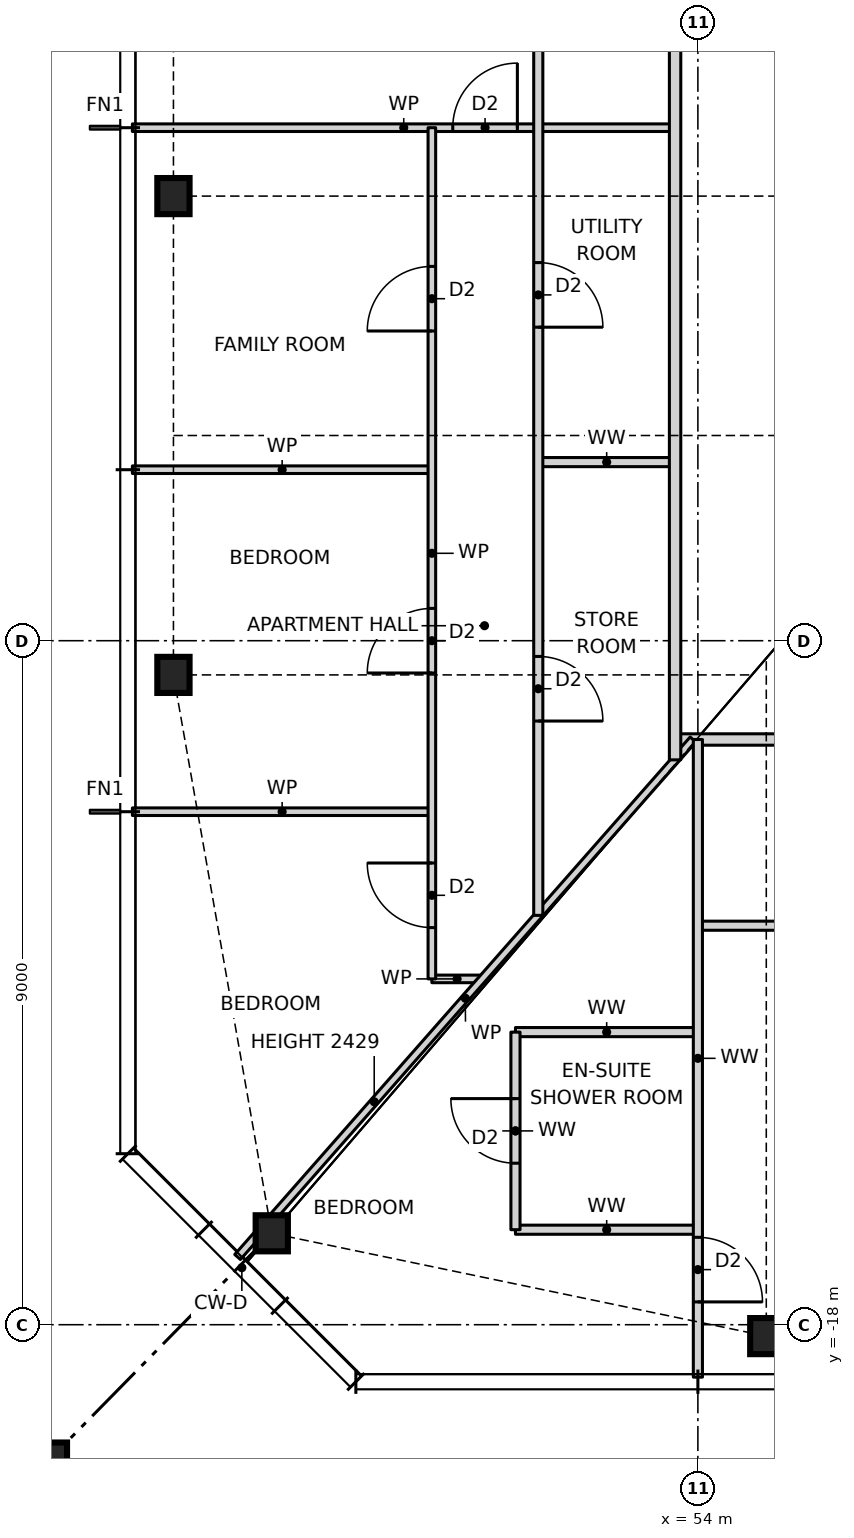
"""IFC4 building model, lengths in metres.
Left out: names, types, materials, properties, quantities, classifications, styles, units other than length and angle.
Written with IfcOpenShell. Run it as: python <this file> out.ifc"""

import sys

from ifc_helpers import new_model, si_unit, direction, frame, frame_2d, origin, origin_2d, place, context, subcontext, project, spatial, rectangle, hollow_rectangle, i_section, extrude, element, fill, save


model = new_model("IFC4")
c1 = context("Model", 3, precision=1e-05, world=origin(), true_north=direction((0.0, 1.0)))
c2 = subcontext(c1, "Body", "Model", "MODEL_VIEW")
j1 = project(units=[si_unit("LENGTHUNIT", "METRE"), si_unit("PLANEANGLEUNIT", "RADIAN")], contexts=[c1])
p1 = place(None, origin())
s1 = spatial("IfcSite", under=j1, at=p1, CompositionType="ELEMENT")
p2 = place(p1, origin())
s2 = spatial("IfcBuilding", under=s1, at=p2, CompositionType="ELEMENT")
p3 = place(p2, frame((0.0, 0.0, 39.5)))
s3 = spatial("IfcBuildingStorey", under=s2, at=p3, CompositionType="ELEMENT", Elevation=39.5)
for number, where, z_axis, x_axis in (
    (1, (48.394, -16.797, 0.0), (0.0, 0.0, 1.0), (1.0, 0.0, 0.0)),
    (2, (54.9, -18.15, 0.0), (0.0, 0.0, 1.0), (1.0, 0.0, 0.0)),
    (3, (47.1, -3.15, 0.0), (0.0, 0.0, 1.0), (1.0, 0.0, 0.0)),
    (4, (47.1, -9.45, 0.0), (0.0, 0.0, 1.0), (1.0, 0.0, 0.0)),
):
    element("IfcColumn", number, at=place(p3, frame(where, z_axis=z_axis, x_axis=x_axis)), inside=s3, PredefinedType="COLUMN", context=c2, shape_type="SweptSolid", body=[
        extrude(i_section(OverallWidth=0.424, OverallDepth=0.475, WebThickness=0.048, FlangeThickness=0.077, at=origin_2d()), origin(), (0.0, 0.0, 1.0), 3.5),
    ])
p4 = place(p3, frame((45.1, -20.15, 0.0), z_axis=(0.0, 0.0, 1.0), x_axis=(1.0, 0.0, 0.0)))
e5 = element("IfcColumn", 5, at=p4, inside=s3, PredefinedType="COLUMN", context=c2, shape_type="SweptSolid", body=[
    extrude(hollow_rectangle(XDim=1.2, YDim=1.2, WallThickness=0.07, at=origin_2d()), origin(), (0.0, 0.0, 1.0), 3.5),
])
for number, where, z_axis, x_axis in (
    (6, (51.6, -16.75, 0.0), (0.0, 0.0, 1.0), (1.0, 0.0, 0.0)),
    (7, (51.6, -14.15, 0.0), (0.0, 0.0, 1.0), (1.0, 0.0, 0.0)),
):
    element("IfcWall", number, at=place(p3, frame(where, z_axis=z_axis, x_axis=x_axis)), inside=s3, PredefinedType="PARTITIONING", context=c2, shape_type="SweptSolid", body=[
        extrude(rectangle(XDim=2.4, YDim=0.12, at=frame_2d((1.2, 0.0))), origin(), (0.0, 0.0, 1.0), 3.27),
    ])
p5 = place(p3, frame((50.5, -13.45, 0.0), z_axis=(0.0, 0.0, 1.0), x_axis=(1.0, 0.0, 0.0)))
e8 = element("IfcWall", 8, at=p5, inside=s3, PredefinedType="PARTITIONING", context=c2, shape_type="SweptSolid", body=[
    extrude(rectangle(XDim=0.664, YDim=0.1, at=frame_2d((0.332, 0.0))), origin(), (0.0, 0.0, 1.0), 3.27),
])
p6 = place(p3, frame((54.0, -12.75, 0.0), z_axis=(0.0, 0.0, 1.0), x_axis=(1.0, 0.0, 0.0)))
e9 = element("IfcWall", 9, at=p6, inside=s3, PredefinedType="PARTITIONING", context=c2, shape_type="SweptSolid", body=[
    extrude(rectangle(XDim=20.2, YDim=0.12, at=frame_2d((10.1, 0.0))), origin(), (0.0, 0.0, 1.0), 3.27),
])
p7 = place(p6, frame((1.375, 0.0, 0.0)))
e10 = element("IfcOpeningElement", 10, at=p7, cuts=e9, PredefinedType="OPENING", context=c2, shape_type="SweptSolid", body=[
    extrude(rectangle(XDim=0.85, YDim=2.1, at=frame_2d((0.425, 1.05))), frame((0.0, 0.07, 0.0), z_axis=(0.0, -1.0, 0.0), x_axis=(1.0, 0.0, 0.0)), (0.0, 0.0, 1.0), 0.14),
])
p8 = place(p6, frame((4.575, 0.0, 0.0)))
e11 = element("IfcOpeningElement", 11, at=p8, cuts=e9, PredefinedType="OPENING", context=c2, shape_type="SweptSolid", body=[
    extrude(rectangle(XDim=0.85, YDim=2.1, at=frame_2d((0.425, 1.05))), frame((0.0, 0.07, 0.0), z_axis=(0.0, -1.0, 0.0), x_axis=(1.0, 0.0, 0.0)), (0.0, 0.0, 1.0), 0.14),
])
p9 = place(p6, frame((10.225, 0.0, 0.0)))
e12 = element("IfcOpeningElement", 12, at=p9, cuts=e9, PredefinedType="OPENING", context=c2, shape_type="SweptSolid", body=[
    extrude(rectangle(XDim=0.85, YDim=2.1, at=frame_2d((0.425, 1.05))), frame((0.0, 0.07, 0.0), z_axis=(0.0, -1.0, 0.0), x_axis=(1.0, 0.0, 0.0)), (0.0, 0.0, 1.0), 0.14),
])
p10 = place(p6, frame((15.825, 0.0, 0.0)))
e13 = element("IfcOpeningElement", 13, at=p10, cuts=e9, PredefinedType="OPENING", context=c2, shape_type="SweptSolid", body=[
    extrude(rectangle(XDim=0.85, YDim=2.1, at=frame_2d((0.425, 1.05))), frame((0.0, 0.07, 0.0), z_axis=(0.0, -1.0, 0.0), x_axis=(1.0, 0.0, 0.0)), (0.0, 0.0, 1.0), 0.14),
])
p11 = place(p3, frame((46.56, -11.25, 0.0), z_axis=(0.0, 0.0, 1.0), x_axis=(1.0, 0.0, 0.0)))
e14 = element("IfcWall", 14, at=p11, inside=s3, PredefinedType="PARTITIONING", context=c2, shape_type="SweptSolid", body=[
    extrude(rectangle(XDim=3.94, YDim=0.1, at=frame_2d((1.97, 0.0))), origin(), (0.0, 0.0, 1.0), 3.27),
])
p12 = place(p3, frame((53.7, -10.3, 0.0), z_axis=(0.0, 0.0, 1.0), x_axis=(1.0, 0.0, 0.0)))
e15 = element("IfcWall", 15, at=p12, inside=s3, PredefinedType="PARTITIONING", context=c2, shape_type="SweptSolid", body=[
    extrude(rectangle(XDim=18.6, YDim=0.15, at=frame_2d((9.3, 0.0))), origin(), (0.0, 0.0, 1.0), 3.27),
])
p13 = place(p12, frame((4.8, 0.0, 0.0)))
e16 = element("IfcOpeningElement", 16, at=p13, cuts=e15, PredefinedType="OPENING", context=c2, shape_type="SweptSolid", body=[
    extrude(rectangle(XDim=1.0, YDim=2.1, at=frame_2d((0.5, 1.05))), frame((0.0, 0.085, 0.0), z_axis=(0.0, -1.0, 0.0), x_axis=(1.0, 0.0, 0.0)), (0.0, 0.0, 1.0), 0.17),
])
p14 = place(p3, frame((46.56, -6.75, 0.0), z_axis=(0.0, 0.0, 1.0), x_axis=(1.0, 0.0, 0.0)))
e17 = element("IfcWall", 17, at=p14, inside=s3, PredefinedType="PARTITIONING", context=c2, shape_type="SweptSolid", body=[
    extrude(rectangle(XDim=3.94, YDim=0.1, at=frame_2d((1.97, 0.0))), origin(), (0.0, 0.0, 1.0), 3.27),
])
p15 = place(p3, frame((51.9, -6.65, 0.0), z_axis=(0.0, 0.0, 1.0), x_axis=(1.0, 0.0, 0.0)))
e18 = element("IfcWall", 18, at=p15, inside=s3, PredefinedType="PARTITIONING", context=c2, shape_type="SweptSolid", body=[
    extrude(rectangle(XDim=1.8, YDim=0.12, at=frame_2d((0.9, 0.0))), origin(), (0.0, 0.0, 1.0), 3.27),
])
p16 = place(p3, frame((46.56, -2.25, 0.0), z_axis=(0.0, 0.0, 1.0), x_axis=(1.0, 0.0, 0.0)))
e19 = element("IfcWall", 19, at=p16, inside=s3, PredefinedType="PARTITIONING", context=c2, shape_type="SweptSolid", body=[
    extrude(rectangle(XDim=7.14, YDim=0.1, at=frame_2d((3.57, 0.0))), origin(), (0.0, 0.0, 1.0), 3.27),
])
p17 = place(p16, frame((4.215, 0.0, 0.0)))
e20 = element("IfcOpeningElement", 20, at=p17, cuts=e19, PredefinedType="OPENING", context=c2, shape_type="SweptSolid", body=[
    extrude(rectangle(XDim=0.85, YDim=2.1, at=frame_2d((0.425, 1.05))), frame((0.0, 0.06, 0.0), z_axis=(0.0, -1.0, 0.0), x_axis=(1.0, 0.0, 0.0)), (0.0, 0.0, 1.0), 0.12),
])
p18 = place(p3, frame((47.944, -17.109, 0.0), z_axis=(0.0, 0.0, 1.0), x_axis=(0.660638210404, 0.750704439146, 0.0)))
e21 = element("IfcWall", 21, at=p18, inside=s3, PredefinedType="PARTITIONING", context=c2, shape_type="SweptSolid", body=[
    extrude(rectangle(XDim=9.07, YDim=0.1, at=frame_2d((4.535, 0.0))), origin(), (0.0, 0.0, 1.0), 2.429),
])
p19 = place(p3, frame((54.0, -18.69, 0.0), z_axis=(0.0, 0.0, 1.0), x_axis=(0.0, 1.0, 0.0)))
e22 = element("IfcWall", 22, at=p19, inside=s3, PredefinedType="PARTITIONING", context=c2, shape_type="SweptSolid", body=[
    extrude(rectangle(XDim=8.39, YDim=0.12, at=frame_2d((4.195, 0.0))), origin(), (0.0, 0.0, 1.0), 3.27),
])
p20 = place(p19, frame((0.99, 0.0, 0.0)))
e23 = element("IfcOpeningElement", 23, at=p20, cuts=e22, PredefinedType="OPENING", context=c2, shape_type="SweptSolid", body=[
    extrude(rectangle(XDim=0.85, YDim=2.1, at=frame_2d((0.425, 1.05))), frame((0.0, 0.07, 0.0), z_axis=(0.0, -1.0, 0.0), x_axis=(1.0, 0.0, 0.0)), (0.0, 0.0, 1.0), 0.14),
])
p21 = place(p3, frame((53.7, -10.568, 0.0), z_axis=(0.0, 0.0, 1.0), x_axis=(0.0, 1.0, 0.0)))
e24 = element("IfcWall", 24, at=p21, inside=s3, PredefinedType="PARTITIONING", context=c2, shape_type="SweptSolid", body=[
    extrude(rectangle(XDim=21.468, YDim=0.15, at=frame_2d((10.734, 0.0))), origin(), (0.0, 0.0, 1.0), 3.27),
])
p22 = place(p21, frame((11.818, 0.0, 0.0)))
e25 = element("IfcOpeningElement", 25, at=p22, cuts=e24, PredefinedType="OPENING", context=c2, shape_type="SweptSolid", body=[
    extrude(rectangle(XDim=1.0, YDim=2.1, at=frame_2d((0.5, 1.05))), frame((0.0, 0.085, 0.0), z_axis=(0.0, -1.0, 0.0), x_axis=(1.0, 0.0, 0.0)), (0.0, 0.0, 1.0), 0.17),
])
p23 = place(p3, frame((51.9, -12.614, 0.0), z_axis=(0.0, 0.0, 1.0), x_axis=(0.0, 1.0, 0.0)))
e26 = element("IfcWall", 26, at=p23, inside=s3, PredefinedType="PARTITIONING", context=c2, shape_type="SweptSolid", body=[
    extrude(rectangle(XDim=25.228, YDim=0.12, at=frame_2d((12.614, 0.0))), origin(), (0.0, 0.0, 1.0), 3.27),
])
p24 = place(p23, frame((17.139, 0.0, 0.0)))
e27 = element("IfcOpeningElement", 27, at=p24, cuts=e26, PredefinedType="OPENING", context=c2, shape_type="SweptSolid", body=[
    extrude(rectangle(XDim=0.85, YDim=2.1, at=frame_2d((0.425, 1.05))), frame((0.0, 0.07, 0.0), z_axis=(0.0, -1.0, 0.0), x_axis=(1.0, 0.0, 0.0)), (0.0, 0.0, 1.0), 0.14),
])
p25 = place(p23, frame((13.939, 0.0, 0.0)))
e28 = element("IfcOpeningElement", 28, at=p25, cuts=e26, PredefinedType="OPENING", context=c2, shape_type="SweptSolid", body=[
    extrude(rectangle(XDim=0.85, YDim=2.1, at=frame_2d((0.425, 1.05))), frame((0.0, 0.07, 0.0), z_axis=(0.0, -1.0, 0.0), x_axis=(1.0, 0.0, 0.0)), (0.0, 0.0, 1.0), 0.14),
])
p26 = place(p23, frame((21.871, 0.0, 0.0)))
e29 = element("IfcOpeningElement", 29, at=p26, cuts=e26, PredefinedType="OPENING", context=c2, shape_type="SweptSolid", body=[
    extrude(rectangle(XDim=0.85, YDim=2.1, at=frame_2d((0.425, 1.05))), frame((0.0, 0.07, 0.0), z_axis=(0.0, -1.0, 0.0), x_axis=(1.0, 0.0, 0.0)), (0.0, 0.0, 1.0), 0.14),
])
p27 = place(p23, frame((7.739, 0.0, 0.0)))
e30 = element("IfcOpeningElement", 30, at=p27, cuts=e26, PredefinedType="OPENING", context=c2, shape_type="SweptSolid", body=[
    extrude(rectangle(XDim=0.85, YDim=2.1, at=frame_2d((0.425, 1.05))), frame((0.0, 0.07, 0.0), z_axis=(0.0, -1.0, 0.0), x_axis=(1.0, 0.0, 0.0)), (0.0, 0.0, 1.0), 0.14),
])
p28 = place(p23, frame((2.557, 0.0, 0.0)))
e31 = element("IfcOpeningElement", 31, at=p28, cuts=e26, PredefinedType="OPENING", context=c2, shape_type="SweptSolid", body=[
    extrude(rectangle(XDim=0.85, YDim=2.1, at=frame_2d((0.425, 1.05))), frame((0.0, 0.07, 0.0), z_axis=(0.0, -1.0, 0.0), x_axis=(1.0, 0.0, 0.0)), (0.0, 0.0, 1.0), 0.14),
])
p29 = place(p3, frame((51.6, -16.75, 0.0), z_axis=(0.0, 0.0, 1.0), x_axis=(0.0, 1.0, 0.0)))
e32 = element("IfcWall", 32, at=p29, inside=s3, PredefinedType="PARTITIONING", context=c2, shape_type="SweptSolid", body=[
    extrude(rectangle(XDim=2.6, YDim=0.12, at=frame_2d((1.3, 0.0))), origin(), (0.0, 0.0, 1.0), 3.27),
])
p30 = place(p29, frame((0.875, 0.0, 0.0)))
e33 = element("IfcOpeningElement", 33, at=p30, cuts=e32, PredefinedType="OPENING", context=c2, shape_type="SweptSolid", body=[
    extrude(rectangle(XDim=0.85, YDim=2.1, at=frame_2d((0.425, 1.05))), frame((0.0, 0.07, 0.0), z_axis=(0.0, -1.0, 0.0), x_axis=(1.0, 0.0, 0.0)), (0.0, 0.0, 1.0), 0.14),
])
p31 = place(p3, frame((50.5, -13.45, 0.0), z_axis=(0.0, 0.0, 1.0), x_axis=(0.0, 1.0, 0.0)))
e34 = element("IfcWall", 34, at=p31, inside=s3, PredefinedType="PARTITIONING", context=c2, shape_type="SweptSolid", body=[
    extrude(rectangle(XDim=11.2, YDim=0.1, at=frame_2d((5.6, 0.0))), origin(), (0.0, 0.0, 1.0), 3.27),
])
p32 = place(p31, frame((8.525, 0.0, 0.0)))
e35 = element("IfcOpeningElement", 35, at=p32, cuts=e34, PredefinedType="OPENING", context=c2, shape_type="SweptSolid", body=[
    extrude(rectangle(XDim=0.85, YDim=2.1, at=frame_2d((0.425, 1.05))), frame((0.0, 0.06, 0.0), z_axis=(0.0, -1.0, 0.0), x_axis=(1.0, 0.0, 0.0)), (0.0, 0.0, 1.0), 0.12),
])
p33 = place(p31, frame((4.025, 0.0, 0.0)))
e36 = element("IfcOpeningElement", 36, at=p33, cuts=e34, PredefinedType="OPENING", context=c2, shape_type="SweptSolid", body=[
    extrude(rectangle(XDim=0.85, YDim=2.1, at=frame_2d((0.425, 1.05))), frame((0.0, 0.06, 0.0), z_axis=(0.0, -1.0, 0.0), x_axis=(1.0, 0.0, 0.0)), (0.0, 0.0, 1.0), 0.12),
])
p34 = place(p31, frame((0.675, 0.0, 0.0)))
e37 = element("IfcOpeningElement", 37, at=p34, cuts=e34, PredefinedType="OPENING", context=c2, shape_type="SweptSolid", body=[
    extrude(rectangle(XDim=0.85, YDim=2.1, at=frame_2d((0.425, 1.05))), frame((0.0, 0.06, 0.0), z_axis=(0.0, -1.0, 0.0), x_axis=(1.0, 0.0, 0.0)), (0.0, 0.0, 1.0), 0.12),
])
p35 = place(p30, origin())
e38 = element("IfcDoor", 38, at=p35, inside=s3, OperationType="SINGLE_SWING_RIGHT", PredefinedType="DOOR", context=c2, shape_type="SweptSolid", body=[
    extrude(rectangle(XDim=0.85, YDim=2.1, at=frame_2d((0.425, 1.05))), frame((0.0, 0.025, 0.0), z_axis=(0.0, -1.0, 0.0), x_axis=(1.0, 0.0, 0.0)), (0.0, 0.0, 1.0), 0.05),
])
fill(e33, e38)
p36 = place(p20, frame((0.85, 0.0, 0.0), z_axis=(0.0, 0.0, 1.0), x_axis=(-1.0, 0.0, 0.0)))
e39 = element("IfcDoor", 39, at=p36, inside=s3, OperationType="SINGLE_SWING_RIGHT", PredefinedType="DOOR", context=c2, shape_type="SweptSolid", body=[
    extrude(rectangle(XDim=0.85, YDim=2.1, at=frame_2d((0.425, 1.05))), frame((0.0, 0.025, 0.0), z_axis=(0.0, -1.0, 0.0), x_axis=(1.0, 0.0, 0.0)), (0.0, 0.0, 1.0), 0.05),
])
fill(e23, e39)
p37 = place(p17, origin())
e40 = element("IfcDoor", 40, at=p37, inside=s3, OperationType="SINGLE_SWING_RIGHT", PredefinedType="DOOR", context=c2, shape_type="SweptSolid", body=[
    extrude(rectangle(XDim=0.85, YDim=2.1, at=frame_2d((0.425, 1.05))), frame((0.0, 0.025, 0.0), z_axis=(0.0, -1.0, 0.0), x_axis=(1.0, 0.0, 0.0)), (0.0, 0.0, 1.0), 0.05),
])
fill(e20, e40)
p38 = place(p32, origin())
e41 = element("IfcDoor", 41, at=p38, inside=s3, OperationType="SINGLE_SWING_LEFT", PredefinedType="DOOR", context=c2, shape_type="SweptSolid", body=[
    extrude(rectangle(XDim=0.85, YDim=2.1, at=frame_2d((0.425, 1.05))), frame((0.0, 0.025, 0.0), z_axis=(0.0, -1.0, 0.0), x_axis=(1.0, 0.0, 0.0)), (0.0, 0.0, 1.0), 0.05),
])
fill(e35, e41)
p39 = place(p33, origin())
e42 = element("IfcDoor", 42, at=p39, inside=s3, OperationType="SINGLE_SWING_LEFT", PredefinedType="DOOR", context=c2, shape_type="SweptSolid", body=[
    extrude(rectangle(XDim=0.85, YDim=2.1, at=frame_2d((0.425, 1.05))), frame((0.0, 0.025, 0.0), z_axis=(0.0, -1.0, 0.0), x_axis=(1.0, 0.0, 0.0)), (0.0, 0.0, 1.0), 0.05),
])
fill(e36, e42)
p40 = place(p34, origin())
e43 = element("IfcDoor", 43, at=p40, inside=s3, OperationType="SINGLE_SWING_RIGHT", PredefinedType="DOOR", context=c2, shape_type="SweptSolid", body=[
    extrude(rectangle(XDim=0.85, YDim=2.1, at=frame_2d((0.425, 1.05))), frame((0.0, 0.025, 0.0), z_axis=(0.0, -1.0, 0.0), x_axis=(1.0, 0.0, 0.0)), (0.0, 0.0, 1.0), 0.05),
])
fill(e37, e43)
p41 = place(p27, frame((0.85, 0.0, 0.0), z_axis=(0.0, 0.0, 1.0), x_axis=(-1.0, 0.0, 0.0)))
e44 = element("IfcDoor", 44, at=p41, inside=s3, OperationType="SINGLE_SWING_RIGHT", PredefinedType="DOOR", context=c2, shape_type="SweptSolid", body=[
    extrude(rectangle(XDim=0.85, YDim=2.1, at=frame_2d((0.425, 1.05))), frame((0.0, 0.025, 0.0), z_axis=(0.0, -1.0, 0.0), x_axis=(1.0, 0.0, 0.0)), (0.0, 0.0, 1.0), 0.05),
])
fill(e30, e44)
p42 = place(p28, frame((0.85, 0.0, 0.0), z_axis=(0.0, 0.0, 1.0), x_axis=(-1.0, 0.0, 0.0)))
e45 = element("IfcDoor", 45, at=p42, inside=s3, OperationType="SINGLE_SWING_RIGHT", PredefinedType="DOOR", context=c2, shape_type="SweptSolid", body=[
    extrude(rectangle(XDim=0.85, YDim=2.1, at=frame_2d((0.425, 1.05))), frame((0.0, 0.025, 0.0), z_axis=(0.0, -1.0, 0.0), x_axis=(1.0, 0.0, 0.0)), (0.0, 0.0, 1.0), 0.05),
])
fill(e31, e45)
save(model, sys.argv[1])
